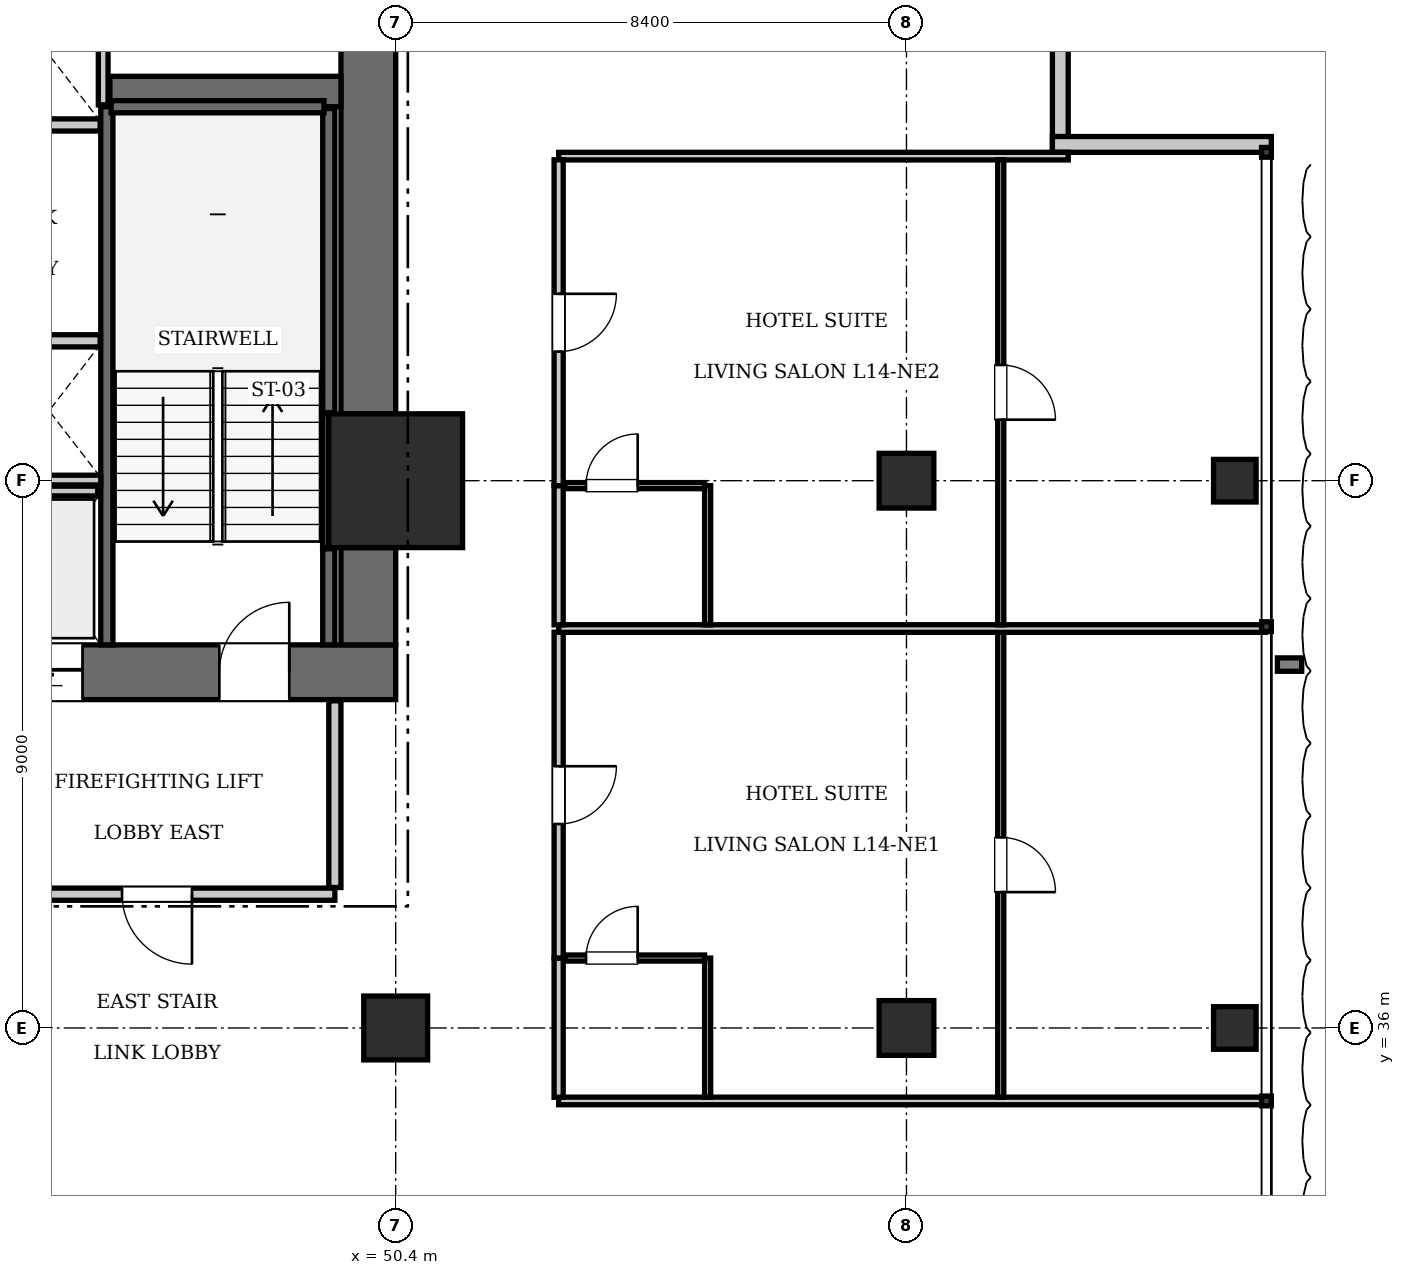
"""IFC4 building model, lengths in metres.
Left out: names, types, materials, properties, quantities, classifications, styles, units other than length and angle.
Written with IfcOpenShell. Run it as: python <this file> out.ifc"""

import sys

from ifc_helpers import new_model, si_unit, direction, frame, frame_2d, origin, origin_2d, place, context, subcontext, project, spatial, rectangle, i_section, extrude, element, fill, save


model = new_model("IFC4")
c1 = context("Model", 3, precision=1e-05, world=origin(), true_north=direction((0.0, 1.0)))
c2 = subcontext(c1, "Body", "Model", "MODEL_VIEW")
j1 = project(units=[si_unit("LENGTHUNIT", "METRE"), si_unit("PLANEANGLEUNIT", "RADIAN")], contexts=[c1])
p1 = place(None, origin())
s1 = spatial("IfcSite", under=j1, at=p1, CompositionType="ELEMENT")
p2 = place(p1, origin())
s2 = spatial("IfcBuilding", under=s1, at=p2, CompositionType="ELEMENT")
p3 = place(p2, frame((0.0, 0.0, 61.6)))
s3 = spatial("IfcBuildingStorey", under=s2, at=p3, CompositionType="ELEMENT", Elevation=61.6)
p4 = place(p3, frame((50.4, 45.0, 0.0), z_axis=(0.0, 0.0, 1.0), x_axis=(1.0, 0.0, 0.0)))
e1 = element("IfcColumn", 1, at=p4, inside=s3, PredefinedType="COLUMN", context=c2, shape_type="SweptSolid", body=[
    extrude(rectangle(XDim=2.2, YDim=2.2, at=origin_2d()), origin(), (0.0, 0.0, 1.0), 3.85),
])
p5 = place(p3, frame((43.6, 41.85, 0.0), z_axis=(0.0, 0.0, 1.0), x_axis=(1.0, 0.0, 0.0)))
e2 = element("IfcWall", 2, at=p5, inside=s3, PredefinedType="SHEAR", context=c2, shape_type="SweptSolid", body=[
    extrude(rectangle(XDim=6.8, YDim=0.9, at=frame_2d((3.4, 0.0))), origin(), (0.0, 0.0, 1.0), 3.85),
])
p6 = place(p5, frame((3.9, 0.0, 0.0)))
e3 = element("IfcOpeningElement", 3, at=p6, cuts=e2, PredefinedType="OPENING", context=c2, shape_type="SweptSolid", body=[
    extrude(rectangle(XDim=1.15, YDim=2.15, at=frame_2d((0.575, 1.075))), frame((0.0, 0.46, 0.0), z_axis=(0.0, -1.0, 0.0), x_axis=(1.0, 0.0, 0.0)), (0.0, 0.0, 1.0), 0.92),
])
p7 = place(p5, frame((0.55, 0.0, 0.0)))
e4 = element("IfcOpeningElement", 4, at=p7, cuts=e2, PredefinedType="OPENING", context=c2, shape_type="SweptSolid", body=[
    extrude(rectangle(XDim=1.1, YDim=2.2, at=frame_2d((0.55, 1.1))), frame((0.0, 0.46, 0.0), z_axis=(0.0, -1.0, 0.0), x_axis=(1.0, 0.0, 0.0)), (0.0, 0.0, 1.0), 0.92),
])
p8 = place(p3, frame((49.95, 42.3, 0.0), z_axis=(0.0, 0.0, 1.0), x_axis=(0.0, 1.0, 0.0)))
e5 = element("IfcWall", 5, at=p8, inside=s3, PredefinedType="SHEAR", context=c2, shape_type="SweptSolid", body=[
    extrude(rectangle(XDim=1.6, YDim=0.9, at=frame_2d((0.8, 0.0))), origin(), (0.0, 0.0, 1.0), 3.85),
])
p9 = place(p3, frame((49.95, 46.1, 0.0), z_axis=(0.0, 0.0, 1.0), x_axis=(0.0, 1.0, 0.0)))
e6 = element("IfcWall", 6, at=p9, inside=s3, PredefinedType="SHEAR", context=c2, shape_type="SweptSolid", body=[
    extrude(rectangle(XDim=7.0, YDim=0.9, at=frame_2d((3.5, 0.0))), origin(), (0.0, 0.0, 1.0), 3.85),
])
p10 = place(p3, frame((45.7, 51.4, 0.0), z_axis=(0.0, 0.0, 1.0), x_axis=(1.0, 0.0, 0.0)))
e7 = element("IfcWall", 7, at=p10, inside=s3, PredefinedType="SHEAR", context=c2, shape_type="SweptSolid", body=[
    extrude(rectangle(XDim=3.8, YDim=0.5, at=frame_2d((1.9, 0.0))), origin(), (0.0, 0.0, 1.0), 3.85),
])
p11 = place(p3, frame((50.4, 36.0, 0.0), z_axis=(0.0, 0.0, 1.0), x_axis=(1.0, 0.0, 0.0)))
e8 = element("IfcColumn", 8, at=p11, inside=s3, PredefinedType="COLUMN", context=c2, shape_type="SweptSolid", body=[
    extrude(rectangle(XDim=1.05, YDim=1.05, at=origin_2d()), origin(), (0.0, 0.0, 1.0), 3.85),
])
for number, where, z_axis, x_axis in (
    (9, (58.8, 36.0, 0.0), (0.0, 0.0, 1.0), (1.0, 0.0, 0.0)),
    (10, (58.8, 45.0, 0.0), (0.0, 0.0, 1.0), (1.0, 0.0, 0.0)),
):
    element("IfcColumn", number, at=place(p3, frame(where, z_axis=z_axis, x_axis=x_axis)), inside=s3, PredefinedType="COLUMN", context=c2, shape_type="SweptSolid", body=[
        extrude(rectangle(XDim=0.9, YDim=0.9, at=origin_2d()), origin(), (0.0, 0.0, 1.0), 3.85),
    ])
for number, where, z_axis, x_axis in (
    (11, (64.2, 36.0, 0.0), (0.0, 0.0, 1.0), (1.0, 0.0, 0.0)),
    (12, (64.2, 45.0, 0.0), (0.0, 0.0, 1.0), (1.0, 0.0, 0.0)),
):
    element("IfcColumn", number, at=place(p3, frame(where, z_axis=z_axis, x_axis=x_axis)), inside=s3, PredefinedType="COLUMN", context=c2, shape_type="SweptSolid", body=[
        extrude(i_section(OverallWidth=0.7, OverallDepth=0.7, WebThickness=0.028, FlangeThickness=0.044, at=origin_2d()), origin(), (0.0, 0.0, 1.0), 3.85),
    ])
p12 = place(p3, frame((45.65, 42.3, 0.0), z_axis=(0.0, 0.0, 1.0), x_axis=(0.0, 1.0, 0.0)))
e13 = element("IfcWall", 13, at=p12, inside=s3, PredefinedType="SOLIDWALL", context=c2, shape_type="SweptSolid", body=[
    extrude(rectangle(XDim=8.85, YDim=0.2, at=frame_2d((4.425, 0.0))), origin(), (0.0, 0.0, 1.0), 3.61),
])
p13 = place(p3, frame((49.3, 42.3, 0.0), z_axis=(0.0, 0.0, 1.0), x_axis=(0.0, 1.0, 0.0)))
e14 = element("IfcWall", 14, at=p13, inside=s3, PredefinedType="SOLIDWALL", context=c2, shape_type="SweptSolid", body=[
    extrude(rectangle(XDim=1.58, YDim=0.2, at=frame_2d((0.79, 0.0))), origin(), (0.0, 0.0, 1.0), 3.61),
])
p14 = place(p3, frame((49.3, 46.12, 0.0), z_axis=(0.0, 0.0, 1.0), x_axis=(0.0, 1.0, 0.0)))
e15 = element("IfcWall", 15, at=p14, inside=s3, PredefinedType="SOLIDWALL", context=c2, shape_type="SweptSolid", body=[
    extrude(rectangle(XDim=5.0, YDim=0.2, at=frame_2d((2.5, 0.0))), origin(), (0.0, 0.0, 1.0), 3.61),
])
p15 = place(p3, frame((45.72, 51.15, 0.0), z_axis=(0.0, 0.0, 1.0), x_axis=(1.0, 0.0, 0.0)))
e16 = element("IfcWall", 16, at=p15, inside=s3, PredefinedType="SOLIDWALL", context=c2, shape_type="SweptSolid", body=[
    extrude(rectangle(XDim=3.5, YDim=0.2, at=frame_2d((1.75, 0.0))), origin(), (0.0, 0.0, 1.0), 3.61),
])
p16 = place(p3, frame((49.248, 43.9, 0.0), z_axis=(0.0, 0.0, 1.0), x_axis=(0.0, 1.0, 0.0)))
e17 = element("IfcWall", 17, at=p16, inside=s3, PredefinedType="SOLIDWALL", context=c2, shape_type="SweptSolid", body=[
    extrude(rectangle(XDim=2.2, YDim=0.1, at=frame_2d((1.1, 0.0))), origin(), (0.0, 0.0, 1.0), 3.61),
])
for number, where, z_axis, x_axis in (
    (18, (43.86, 47.3, 0.0), (0.0, 0.0, 1.0), (1.0, 0.0, 0.0)),
    (19, (43.86, 50.85, 0.0), (0.0, 0.0, 1.0), (1.0, 0.0, 0.0)),
):
    element("IfcWall", number, at=place(p3, frame(where, z_axis=z_axis, x_axis=x_axis)), inside=s3, PredefinedType="SOLIDWALL", context=c2, shape_type="SweptSolid", body=[
        extrude(rectangle(XDim=1.68, YDim=0.2, at=frame_2d((0.84, 0.0))), origin(), (0.0, 0.0, 1.0), 3.61),
    ])
p17 = place(p3, frame((43.9, 44.83, 0.0), z_axis=(0.0, 0.0, 1.0), x_axis=(1.0, 0.0, 0.0)))
e20 = element("IfcWall", 20, at=p17, inside=s3, PredefinedType="SOLIDWALL", context=c2, shape_type="SweptSolid", body=[
    extrude(rectangle(XDim=1.6, YDim=0.16, at=frame_2d((0.8, 0.0))), origin(), (0.0, 0.0, 1.0), 3.61),
])
p18 = place(p3, frame((42.1, 45.01, 0.0), z_axis=(0.0, 0.0, 1.0), x_axis=(1.0, 0.0, 0.0)))
e21 = element("IfcWall", 21, at=p18, inside=s3, PredefinedType="SOLIDWALL", context=c2, shape_type="SweptSolid", body=[
    extrude(rectangle(XDim=3.45, YDim=0.16, at=frame_2d((1.725, 0.0))), origin(), (0.0, 0.0, 1.0), 3.61),
])
p19 = place(p3, frame((45.59, 51.18, 0.0), z_axis=(0.0, 0.0, 1.0), x_axis=(0.0, 1.0, 0.0)))
e22 = element("IfcWall", 22, at=p19, inside=s3, PredefinedType="SOLIDWALL", context=c2, shape_type="SweptSolid", body=[
    extrude(rectangle(XDim=1.92, YDim=0.16, at=frame_2d((0.96, 0.0))), origin(), (0.0, 0.0, 1.0), 3.61),
])
for number, where, z_axis, x_axis in (
    (23, (61.33, 54.0, 0.0), (0.0, 0.0, 1.0), (0.0, -1.0, 0.0)),
    (24, (61.2, 50.53, 0.0), (0.0, 0.0, 1.0), (1.0, 0.0, 0.0)),
):
    element("IfcWall", number, at=place(p3, frame(where, z_axis=z_axis, x_axis=x_axis)), inside=s3, PredefinedType="SOLIDWALL", context=c2, shape_type="SweptSolid", body=[
        extrude(rectangle(XDim=3.6, YDim=0.26, at=frame_2d((1.8, 0.0))), origin(), (0.0, 0.0, 1.0), 3.61),
    ])
p20 = place(p3, frame((43.6, 38.2, 0.0), z_axis=(0.0, 0.0, 1.0), x_axis=(1.0, 0.0, 0.0)))
e25 = element("IfcWall", 25, at=p20, inside=s3, PredefinedType="PARTITIONING", context=c2, shape_type="SweptSolid", body=[
    extrude(rectangle(XDim=5.8, YDim=0.2, at=frame_2d((2.9, 0.0))), origin(), (0.0, 0.0, 1.0), 3.61),
])
p21 = place(p20, frame((2.3, 0.0, 0.0)))
e26 = element("IfcOpeningElement", 26, at=p21, cuts=e25, PredefinedType="OPENING", context=c2, shape_type="SweptSolid", body=[
    extrude(rectangle(XDim=1.15, YDim=2.15, at=frame_2d((0.575, 1.075))), frame((0.0, 0.11, 0.0), z_axis=(0.0, -1.0, 0.0), x_axis=(1.0, 0.0, 0.0)), (0.0, 0.0, 1.0), 0.22),
])
p22 = place(p3, frame((49.4, 38.31, 0.0), z_axis=(0.0, 0.0, 1.0), x_axis=(0.0, 1.0, 0.0)))
e27 = element("IfcWall", 27, at=p22, inside=s3, PredefinedType="PARTITIONING", context=c2, shape_type="SweptSolid", body=[
    extrude(rectangle(XDim=3.07, YDim=0.2, at=frame_2d((1.535, 0.0))), origin(), (0.0, 0.0, 1.0), 3.61),
])
p23 = place(p3, frame((53.08, 34.8, 0.0), z_axis=(0.0, 0.0, 1.0), x_axis=(1.0, 0.0, 0.0)))
e28 = element("IfcWall", 28, at=p23, inside=s3, PredefinedType="PARTITIONING", context=c2, shape_type="SweptSolid", body=[
    extrude(rectangle(XDim=11.62, YDim=0.125, at=frame_2d((5.81, 0.0))), origin(), (0.0, 0.0, 1.0), 3.61),
])
p24 = place(p3, frame((53.08, 50.337, 0.0), z_axis=(0.0, 0.0, 1.0), x_axis=(1.0, 0.0, 0.0)))
e29 = element("IfcWall", 29, at=p24, inside=s3, PredefinedType="PARTITIONING", context=c2, shape_type="SweptSolid", body=[
    extrude(rectangle(XDim=8.38, YDim=0.125, at=frame_2d((4.19, 0.0))), origin(), (0.0, 0.0, 1.0), 3.61),
])
p25 = place(p3, frame((53.08, 34.86, 0.0), z_axis=(0.0, 0.0, 1.0), x_axis=(0.0, 1.0, 0.0)))
e30 = element("IfcWall", 30, at=p25, inside=s3, PredefinedType="PARTITIONING", context=c2, shape_type="SweptSolid", body=[
    extrude(rectangle(XDim=2.29, YDim=0.15, at=frame_2d((1.145, 0.0))), origin(), (0.0, 0.0, 1.0), 3.61),
])
p26 = place(p3, frame((53.08, 37.15, 0.0), z_axis=(0.0, 0.0, 1.0), x_axis=(0.0, 1.0, 0.0)))
e31 = element("IfcWall", 31, at=p26, inside=s3, PredefinedType="PARTITIONING", context=c2, shape_type="SweptSolid", body=[
    extrude(rectangle(XDim=5.359, YDim=0.15, at=frame_2d((2.679, 0.0))), origin(), (0.0, 0.0, 1.0), 3.61),
])
p27 = place(p26, frame((2.204, 0.0, 0.0)))
e32 = element("IfcOpeningElement", 32, at=p27, cuts=e31, PredefinedType="OPENING", context=c2, shape_type="SweptSolid", body=[
    extrude(rectangle(XDim=0.95, YDim=2.15, at=frame_2d((0.475, 1.075))), frame((0.0, 0.085, 0.0), z_axis=(0.0, -1.0, 0.0), x_axis=(1.0, 0.0, 0.0)), (0.0, 0.0, 1.0), 0.17),
])
p28 = place(p3, frame((55.53, 34.86, 0.0), z_axis=(0.0, 0.0, 1.0), x_axis=(0.0, 1.0, 0.0)))
e33 = element("IfcWall", 33, at=p28, inside=s3, PredefinedType="PARTITIONING", context=c2, shape_type="SweptSolid", body=[
    extrude(rectangle(XDim=2.29, YDim=0.1, at=frame_2d((1.145, 0.0))), origin(), (0.0, 0.0, 1.0), 3.61),
])
p29 = place(p3, frame((53.18, 37.15, 0.0), z_axis=(0.0, 0.0, 1.0), x_axis=(1.0, 0.0, 0.0)))
e34 = element("IfcWall", 34, at=p29, inside=s3, PredefinedType="PARTITIONING", context=c2, shape_type="SweptSolid", body=[
    extrude(rectangle(XDim=2.3, YDim=0.1, at=frame_2d((1.15, 0.0))), origin(), (0.0, 0.0, 1.0), 3.61),
])
p30 = place(p29, frame((0.35, 0.0, 0.0)))
e35 = element("IfcOpeningElement", 35, at=p30, cuts=e34, PredefinedType="OPENING", context=c2, shape_type="SweptSolid", body=[
    extrude(rectangle(XDim=0.85, YDim=2.1, at=frame_2d((0.425, 1.05))), frame((0.0, 0.06, 0.0), z_axis=(0.0, -1.0, 0.0), x_axis=(1.0, 0.0, 0.0)), (0.0, 0.0, 1.0), 0.12),
])
p31 = place(p3, frame((60.35, 34.86, 0.0), z_axis=(0.0, 0.0, 1.0), x_axis=(0.0, 1.0, 0.0)))
e36 = element("IfcWall", 36, at=p31, inside=s3, PredefinedType="PARTITIONING", context=c2, shape_type="SweptSolid", body=[
    extrude(rectangle(XDim=7.649, YDim=0.1, at=frame_2d((3.824, 0.0))), origin(), (0.0, 0.0, 1.0), 3.61),
])
p32 = place(p31, frame((3.374, 0.0, 0.0)))
e37 = element("IfcOpeningElement", 37, at=p32, cuts=e36, PredefinedType="OPENING", context=c2, shape_type="SweptSolid", body=[
    extrude(rectangle(XDim=0.9, YDim=2.1, at=frame_2d((0.45, 1.05))), frame((0.0, 0.06, 0.0), z_axis=(0.0, -1.0, 0.0), x_axis=(1.0, 0.0, 0.0)), (0.0, 0.0, 1.0), 0.12),
])
p33 = place(p3, frame((53.08, 42.569, 0.0), z_axis=(0.0, 0.0, 1.0), x_axis=(1.0, 0.0, 0.0)))
e38 = element("IfcWall", 38, at=p33, inside=s3, PredefinedType="PARTITIONING", context=c2, shape_type="SweptSolid", body=[
    extrude(rectangle(XDim=11.62, YDim=0.125, at=frame_2d((5.81, 0.0))), origin(), (0.0, 0.0, 1.0), 3.61),
])
p34 = place(p3, frame((53.08, 42.629, 0.0), z_axis=(0.0, 0.0, 1.0), x_axis=(0.0, 1.0, 0.0)))
e39 = element("IfcWall", 39, at=p34, inside=s3, PredefinedType="PARTITIONING", context=c2, shape_type="SweptSolid", body=[
    extrude(rectangle(XDim=2.29, YDim=0.15, at=frame_2d((1.145, 0.0))), origin(), (0.0, 0.0, 1.0), 3.61),
])
p35 = place(p3, frame((53.08, 44.919, 0.0), z_axis=(0.0, 0.0, 1.0), x_axis=(0.0, 1.0, 0.0)))
e40 = element("IfcWall", 40, at=p35, inside=s3, PredefinedType="PARTITIONING", context=c2, shape_type="SweptSolid", body=[
    extrude(rectangle(XDim=5.359, YDim=0.15, at=frame_2d((2.679, 0.0))), origin(), (0.0, 0.0, 1.0), 3.61),
])
p36 = place(p35, frame((2.204, 0.0, 0.0)))
e41 = element("IfcOpeningElement", 41, at=p36, cuts=e40, PredefinedType="OPENING", context=c2, shape_type="SweptSolid", body=[
    extrude(rectangle(XDim=0.95, YDim=2.15, at=frame_2d((0.475, 1.075))), frame((0.0, 0.085, 0.0), z_axis=(0.0, -1.0, 0.0), x_axis=(1.0, 0.0, 0.0)), (0.0, 0.0, 1.0), 0.17),
])
p37 = place(p3, frame((55.53, 42.629, 0.0), z_axis=(0.0, 0.0, 1.0), x_axis=(0.0, 1.0, 0.0)))
e42 = element("IfcWall", 42, at=p37, inside=s3, PredefinedType="PARTITIONING", context=c2, shape_type="SweptSolid", body=[
    extrude(rectangle(XDim=2.29, YDim=0.1, at=frame_2d((1.145, 0.0))), origin(), (0.0, 0.0, 1.0), 3.61),
])
p38 = place(p3, frame((53.18, 44.919, 0.0), z_axis=(0.0, 0.0, 1.0), x_axis=(1.0, 0.0, 0.0)))
e43 = element("IfcWall", 43, at=p38, inside=s3, PredefinedType="PARTITIONING", context=c2, shape_type="SweptSolid", body=[
    extrude(rectangle(XDim=2.3, YDim=0.1, at=frame_2d((1.15, 0.0))), origin(), (0.0, 0.0, 1.0), 2.988),
])
p39 = place(p38, frame((0.35, 0.0, 0.0)))
e44 = element("IfcOpeningElement", 44, at=p39, cuts=e43, PredefinedType="OPENING", context=c2, shape_type="SweptSolid", body=[
    extrude(rectangle(XDim=0.85, YDim=2.1, at=frame_2d((0.425, 1.05))), frame((0.0, 0.06, 0.0), z_axis=(0.0, -1.0, 0.0), x_axis=(1.0, 0.0, 0.0)), (0.0, 0.0, 1.0), 0.12),
])
p40 = place(p3, frame((60.35, 42.629, 0.0), z_axis=(0.0, 0.0, 1.0), x_axis=(0.0, 1.0, 0.0)))
e45 = element("IfcWall", 45, at=p40, inside=s3, PredefinedType="PARTITIONING", context=c2, shape_type="SweptSolid", body=[
    extrude(rectangle(XDim=7.649, YDim=0.1, at=frame_2d((3.824, 0.0))), origin(), (0.0, 0.0, 1.0), 3.61),
])
p41 = place(p40, frame((3.375, 0.0, 0.0)))
e46 = element("IfcOpeningElement", 46, at=p41, cuts=e45, PredefinedType="OPENING", context=c2, shape_type="SweptSolid", body=[
    extrude(rectangle(XDim=0.9, YDim=2.1, at=frame_2d((0.45, 1.05))), frame((0.0, 0.06, 0.0), z_axis=(0.0, -1.0, 0.0), x_axis=(1.0, 0.0, 0.0)), (0.0, 0.0, 1.0), 0.12),
])
p42 = place(p6, origin())
e47 = element("IfcDoor", 47, at=p42, inside=s3, OperationType="SINGLE_SWING_RIGHT", PredefinedType="DOOR", context=c2, shape_type="SweptSolid", body=[
    extrude(rectangle(XDim=1.15, YDim=2.15, at=frame_2d((0.575, 1.075))), frame((0.0, 0.025, 0.0), z_axis=(0.0, -1.0, 0.0), x_axis=(1.0, 0.0, 0.0)), (0.0, 0.0, 1.0), 0.05),
])
fill(e3, e47)
p43 = place(p7, frame((1.1, 0.0, 0.0), z_axis=(0.0, 0.0, 1.0), x_axis=(-1.0, 0.0, 0.0)))
e48 = element("IfcDoor", 48, at=p43, inside=s3, OperationType="SLIDING_TO_LEFT", PredefinedType="DOOR", context=c2, shape_type="SweptSolid", body=[
    extrude(rectangle(XDim=1.1, YDim=2.2, at=frame_2d((0.55, 1.1))), frame((0.0, 0.025, 0.0), z_axis=(0.0, -1.0, 0.0), x_axis=(1.0, 0.0, 0.0)), (0.0, 0.0, 1.0), 0.05),
])
fill(e4, e48)
p44 = place(p21, frame((1.15, 0.0, 0.0), z_axis=(0.0, 0.0, 1.0), x_axis=(-1.0, 0.0, 0.0)))
e49 = element("IfcDoor", 49, at=p44, inside=s3, OperationType="SINGLE_SWING_LEFT", PredefinedType="DOOR", context=c2, shape_type="SweptSolid", body=[
    extrude(rectangle(XDim=1.15, YDim=2.15, at=frame_2d((0.575, 1.075))), frame((0.0, 0.025, 0.0), z_axis=(0.0, -1.0, 0.0), x_axis=(1.0, 0.0, 0.0)), (0.0, 0.0, 1.0), 0.05),
])
fill(e26, e49)
p45 = place(p30, origin())
e50 = element("IfcDoor", 50, at=p45, inside=s3, OperationType="SINGLE_SWING_RIGHT", PredefinedType="DOOR", context=c2, shape_type="SweptSolid", body=[
    extrude(rectangle(XDim=0.85, YDim=2.1, at=frame_2d((0.425, 1.05))), frame((0.0, 0.025, 0.0), z_axis=(0.0, -1.0, 0.0), x_axis=(1.0, 0.0, 0.0)), (0.0, 0.0, 1.0), 0.05),
])
fill(e35, e50)
p46 = place(p27, frame((0.95, 0.0, 0.0), z_axis=(0.0, 0.0, 1.0), x_axis=(-1.0, 0.0, 0.0)))
e51 = element("IfcDoor", 51, at=p46, inside=s3, OperationType="SINGLE_SWING_LEFT", PredefinedType="DOOR", context=c2, shape_type="SweptSolid", body=[
    extrude(rectangle(XDim=0.95, YDim=2.15, at=frame_2d((0.475, 1.075))), frame((0.0, 0.025, 0.0), z_axis=(0.0, -1.0, 0.0), x_axis=(1.0, 0.0, 0.0)), (0.0, 0.0, 1.0), 0.05),
])
fill(e32, e51)
p47 = place(p32, frame((0.9, 0.0, 0.0), z_axis=(0.0, 0.0, 1.0), x_axis=(-1.0, 0.0, 0.0)))
e52 = element("IfcDoor", 52, at=p47, inside=s3, OperationType="SINGLE_SWING_RIGHT", PredefinedType="DOOR", context=c2, shape_type="SweptSolid", body=[
    extrude(rectangle(XDim=0.9, YDim=2.1, at=frame_2d((0.45, 1.05))), frame((0.0, 0.025, 0.0), z_axis=(0.0, -1.0, 0.0), x_axis=(1.0, 0.0, 0.0)), (0.0, 0.0, 1.0), 0.05),
])
fill(e37, e52)
p48 = place(p39, origin())
e53 = element("IfcDoor", 53, at=p48, inside=s3, OperationType="SINGLE_SWING_RIGHT", PredefinedType="DOOR", context=c2, shape_type="SweptSolid", body=[
    extrude(rectangle(XDim=0.85, YDim=2.1, at=frame_2d((0.425, 1.05))), frame((0.0, 0.025, 0.0), z_axis=(0.0, -1.0, 0.0), x_axis=(1.0, 0.0, 0.0)), (0.0, 0.0, 1.0), 0.05),
])
fill(e44, e53)
p49 = place(p36, frame((0.95, 0.0, 0.0), z_axis=(0.0, 0.0, 1.0), x_axis=(-1.0, 0.0, 0.0)))
e54 = element("IfcDoor", 54, at=p49, inside=s3, OperationType="SINGLE_SWING_LEFT", PredefinedType="DOOR", context=c2, shape_type="SweptSolid", body=[
    extrude(rectangle(XDim=0.95, YDim=2.15, at=frame_2d((0.475, 1.075))), frame((0.0, 0.025, 0.0), z_axis=(0.0, -1.0, 0.0), x_axis=(1.0, 0.0, 0.0)), (0.0, 0.0, 1.0), 0.05),
])
fill(e41, e54)
p50 = place(p41, frame((0.9, 0.0, 0.0), z_axis=(0.0, 0.0, 1.0), x_axis=(-1.0, 0.0, 0.0)))
e55 = element("IfcDoor", 55, at=p50, inside=s3, OperationType="SINGLE_SWING_RIGHT", PredefinedType="DOOR", context=c2, shape_type="SweptSolid", body=[
    extrude(rectangle(XDim=0.9, YDim=2.1, at=frame_2d((0.45, 1.05))), frame((0.0, 0.025, 0.0), z_axis=(0.0, -1.0, 0.0), x_axis=(1.0, 0.0, 0.0)), (0.0, 0.0, 1.0), 0.05),
])
fill(e46, e55)
save(model, sys.argv[1])
